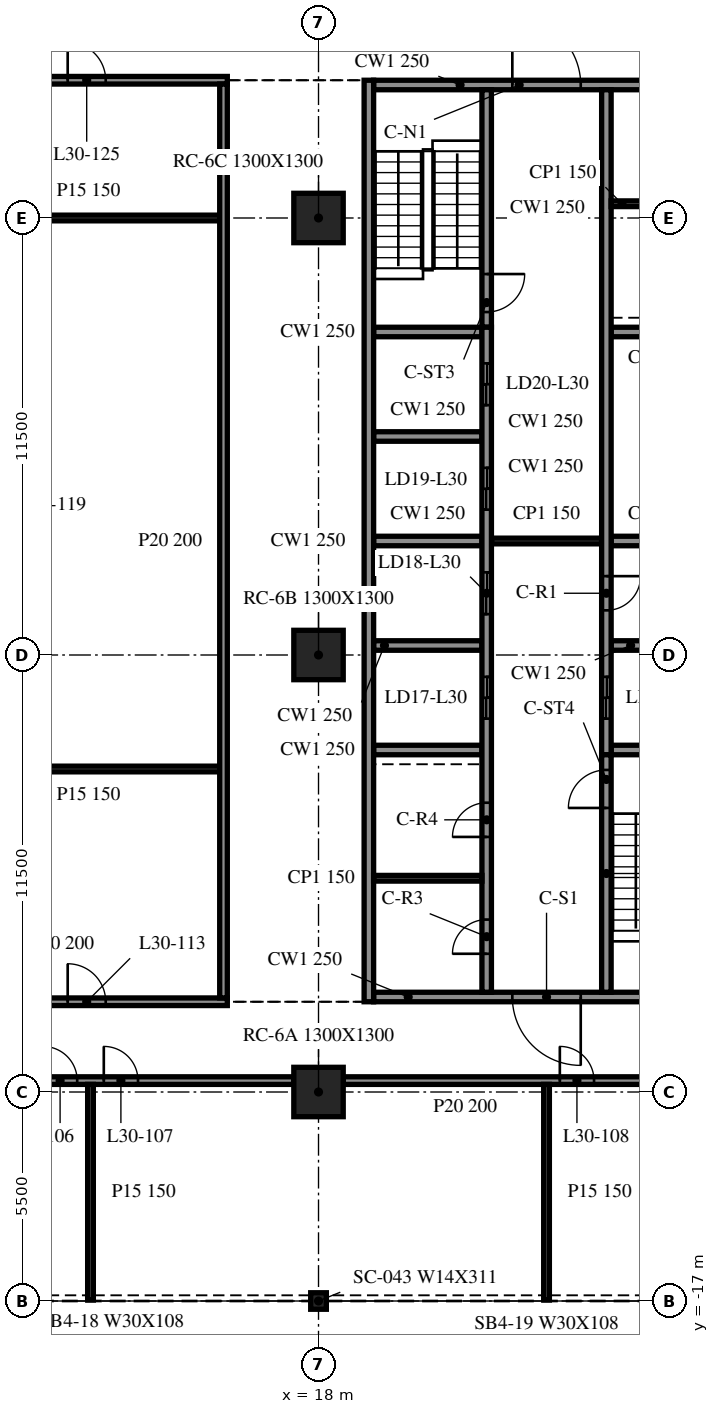
"""IFC4 building model, lengths in metres.
Left out: names, types, materials, properties, quantities, classifications, styles, units other than length and angle.
Written with IfcOpenShell. Run it as: python <this file> out.ifc"""

import sys

from ifc_helpers import new_model, si_unit, direction, frame, frame_2d, origin, origin_2d, place, context, subcontext, project, spatial, rectangle, i_section, extrude, element, fill, save


model = new_model("IFC4")
c1 = context("Model", 3, precision=1e-05, world=origin(), true_north=direction((0.0, 1.0)))
c2 = subcontext(c1, "Body", "Model", "MODEL_VIEW")
j1 = project(units=[si_unit("LENGTHUNIT", "METRE"), si_unit("PLANEANGLEUNIT", "RADIAN")], contexts=[c1])
p1 = place(None, origin())
s1 = spatial("IfcSite", under=j1, at=p1, CompositionType="ELEMENT")
p2 = place(p1, origin())
s2 = spatial("IfcBuilding", under=s1, at=p2, CompositionType="ELEMENT")
p3 = place(p2, frame((0.0, 0.0, 130.2)))
s3 = spatial("IfcBuildingStorey", under=s2, at=p3, CompositionType="ELEMENT", Elevation=130.2)
for number, where, z_axis, x_axis in (
    (1, (18.0, -11.5, -0.34), (0.0, 0.0, 1.0), (1.0, 0.0, 0.0)),
    (2, (18.0, 0.0, -0.34), (0.0, 0.0, 1.0), (1.0, 0.0, 0.0)),
    (3, (18.0, 11.5, -0.34), (0.0, 0.0, 1.0), (1.0, 0.0, 0.0)),
):
    element("IfcColumn", number, at=place(p3, frame(where, z_axis=z_axis, x_axis=x_axis)), inside=s3, PredefinedType="COLUMN", context=c2, shape_type="SweptSolid", body=[
        extrude(rectangle(XDim=1.3, YDim=1.3, at=origin_2d()), origin(), (0.0, 0.0, 1.0), 4.1),
    ])
p4 = place(p3, frame((18.0, -17.0, -0.34), z_axis=(0.0, 0.0, 1.0), x_axis=(1.0, 0.0, 0.0)))
e4 = element("IfcColumn", 4, at=p4, inside=s3, PredefinedType="COLUMN", context=c2, shape_type="SweptSolid", body=[
    extrude(i_section(OverallWidth=0.412, OverallDepth=0.434, WebThickness=0.036, FlangeThickness=0.057, at=origin_2d()), origin(), (0.0, 0.0, 1.0), 4.1),
])
p5 = place(p3, frame((19.325, 15.125, 0.0), z_axis=(0.0, 0.0, 1.0), x_axis=(0.0, -1.0, 0.0)))
e5 = element("IfcWall", 5, at=p5, inside=s3, PredefinedType="SOLIDWALL", context=c2, shape_type="SweptSolid", body=[
    extrude(rectangle(XDim=24.25, YDim=0.25, at=frame_2d((12.125, 0.0))), origin(), (0.0, 0.0, 1.0), 3.76),
])
p6 = place(p3, frame((28.55, -9.0, 0.0), z_axis=(0.0, 0.0, 1.0), x_axis=(-1.0, 0.0, 0.0)))
e6 = element("IfcWall", 6, at=p6, inside=s3, PredefinedType="SOLIDWALL", context=c2, shape_type="SweptSolid", body=[
    extrude(rectangle(XDim=9.1, YDim=0.25, at=frame_2d((4.55, 0.0))), origin(), (0.0, 0.0, 1.0), 3.76),
])
p7 = place(p6, frame((3.65, 0.0, 0.0)))
e7 = element("IfcOpeningElement", 7, at=p7, cuts=e6, PredefinedType="OPENING", context=c2, shape_type="SweptSolid", body=[
    extrude(rectangle(XDim=1.8, YDim=2.1, at=frame_2d((0.9, 1.05))), frame((0.0, 0.135, 0.0), z_axis=(0.0, -1.0, 0.0), x_axis=(1.0, 0.0, 0.0)), (0.0, 0.0, 1.0), 0.27),
])
p8 = place(p3, frame((19.45, 15.0, 0.0), z_axis=(0.0, 0.0, 1.0), x_axis=(1.0, 0.0, 0.0)))
e8 = element("IfcWall", 8, at=p8, inside=s3, PredefinedType="SOLIDWALL", context=c2, shape_type="SweptSolid", body=[
    extrude(rectangle(XDim=9.1, YDim=0.25, at=frame_2d((4.55, 0.0))), origin(), (0.0, 0.0, 1.0), 3.76),
])
p9 = place(p8, frame((3.65, 0.0, 0.0)))
e9 = element("IfcOpeningElement", 9, at=p9, cuts=e8, PredefinedType="OPENING", context=c2, shape_type="SweptSolid", body=[
    extrude(rectangle(XDim=1.8, YDim=2.1, at=frame_2d((0.9, 1.05))), frame((0.0, 0.135, 0.0), z_axis=(0.0, -1.0, 0.0), x_axis=(1.0, 0.0, 0.0)), (0.0, 0.0, 1.0), 0.27),
])
p10 = place(p3, frame((22.425, -8.875, 0.0), z_axis=(0.0, 0.0, 1.0), x_axis=(0.0, 1.0, 0.0)))
e10 = element("IfcWall", 10, at=p10, inside=s3, PredefinedType="SOLIDWALL", context=c2, shape_type="SweptSolid", body=[
    extrude(rectangle(XDim=17.5, YDim=0.25, at=frame_2d((8.75, 0.0))), origin(), (0.0, 0.0, 1.0), 3.76),
])
p11 = place(p10, frame((7.2, 0.0, 0.0)))
e11 = element("IfcOpeningElement", 11, at=p11, cuts=e10, PredefinedType="OPENING", context=c2, shape_type="SweptSolid", body=[
    extrude(rectangle(XDim=1.1, YDim=2.1, at=frame_2d((0.55, 1.05))), frame((0.0, 0.135, 0.0), z_axis=(0.0, -1.0, 0.0), x_axis=(1.0, 0.0, 0.0)), (0.0, 0.0, 1.0), 0.27),
])
p12 = place(p10, frame((9.95, 0.0, 0.0)))
e12 = element("IfcOpeningElement", 12, at=p12, cuts=e10, PredefinedType="OPENING", context=c2, shape_type="SweptSolid", body=[
    extrude(rectangle(XDim=1.1, YDim=2.1, at=frame_2d((0.55, 1.05))), frame((0.0, 0.135, 0.0), z_axis=(0.0, -1.0, 0.0), x_axis=(1.0, 0.0, 0.0)), (0.0, 0.0, 1.0), 0.27),
])
p13 = place(p10, frame((12.7, 0.0, 0.0)))
e13 = element("IfcOpeningElement", 13, at=p13, cuts=e10, PredefinedType="OPENING", context=c2, shape_type="SweptSolid", body=[
    extrude(rectangle(XDim=1.1, YDim=2.1, at=frame_2d((0.55, 1.05))), frame((0.0, 0.135, 0.0), z_axis=(0.0, -1.0, 0.0), x_axis=(1.0, 0.0, 0.0)), (0.0, 0.0, 1.0), 0.27),
])
p14 = place(p10, frame((15.45, 0.0, 0.0)))
e14 = element("IfcOpeningElement", 14, at=p14, cuts=e10, PredefinedType="OPENING", context=c2, shape_type="SweptSolid", body=[
    extrude(rectangle(XDim=1.1, YDim=2.1, at=frame_2d((0.55, 1.05))), frame((0.0, 0.135, 0.0), z_axis=(0.0, -1.0, 0.0), x_axis=(1.0, 0.0, 0.0)), (0.0, 0.0, 1.0), 0.27),
])
p15 = place(p10, frame((1.012, 0.0, 0.0)))
e15 = element("IfcOpeningElement", 15, at=p15, cuts=e10, PredefinedType="OPENING", context=c2, shape_type="SweptSolid", body=[
    extrude(rectangle(XDim=0.9, YDim=2.1, at=frame_2d((0.45, 1.05))), frame((0.0, 0.135, 0.0), z_axis=(0.0, -1.0, 0.0), x_axis=(1.0, 0.0, 0.0)), (0.0, 0.0, 1.0), 0.27),
])
p16 = place(p10, frame((4.087, 0.0, 0.0)))
e16 = element("IfcOpeningElement", 16, at=p16, cuts=e10, PredefinedType="OPENING", context=c2, shape_type="SweptSolid", body=[
    extrude(rectangle(XDim=0.9, YDim=2.1, at=frame_2d((0.45, 1.05))), frame((0.0, 0.135, 0.0), z_axis=(0.0, -1.0, 0.0), x_axis=(1.0, 0.0, 0.0)), (0.0, 0.0, 1.0), 0.27),
])
p17 = place(p3, frame((22.425, 14.875, 0.0), z_axis=(0.0, 0.0, 1.0), x_axis=(0.0, -1.0, 0.0)))
e17 = element("IfcWall", 17, at=p17, inside=s3, PredefinedType="SOLIDWALL", context=c2, shape_type="SweptSolid", body=[
    extrude(rectangle(XDim=6.25, YDim=0.25, at=frame_2d((3.125, 0.0))), origin(), (0.0, 0.0, 1.0), 3.76),
])
p18 = place(p17, frame((4.85, 0.0, 0.0)))
e18 = element("IfcOpeningElement", 18, at=p18, cuts=e17, PredefinedType="OPENING", context=c2, shape_type="SweptSolid", body=[
    extrude(rectangle(XDim=1.0, YDim=2.1, at=frame_2d((0.5, 1.05))), frame((0.0, 0.135, 0.0), z_axis=(0.0, -1.0, 0.0), x_axis=(1.0, 0.0, 0.0)), (0.0, 0.0, 1.0), 0.27),
])
p19 = place(p3, frame((25.575, -8.875, 0.0), z_axis=(0.0, 0.0, 1.0), x_axis=(0.0, 1.0, 0.0)))
e19 = element("IfcWall", 19, at=p19, inside=s3, PredefinedType="SOLIDWALL", context=c2, shape_type="SweptSolid", body=[
    extrude(rectangle(XDim=6.25, YDim=0.25, at=frame_2d((3.125, 0.0))), origin(), (0.0, 0.0, 1.0), 3.76),
])
p20 = place(p19, frame((4.85, 0.0, 0.0)))
e20 = element("IfcOpeningElement", 20, at=p20, cuts=e19, PredefinedType="OPENING", context=c2, shape_type="SweptSolid", body=[
    extrude(rectangle(XDim=1.0, YDim=2.1, at=frame_2d((0.5, 1.05))), frame((0.0, 0.135, 0.0), z_axis=(0.0, -1.0, 0.0), x_axis=(1.0, 0.0, 0.0)), (0.0, 0.0, 1.0), 0.27),
])
p21 = place(p3, frame((25.575, 14.875, 0.0), z_axis=(0.0, 0.0, 1.0), x_axis=(0.0, -1.0, 0.0)))
e21 = element("IfcWall", 21, at=p21, inside=s3, PredefinedType="SOLIDWALL", context=c2, shape_type="SweptSolid", body=[
    extrude(rectangle(XDim=17.5, YDim=0.25, at=frame_2d((8.75, 0.0))), origin(), (0.0, 0.0, 1.0), 3.76),
])
p22 = place(p21, frame((15.45, 0.0, 0.0)))
e22 = element("IfcOpeningElement", 22, at=p22, cuts=e21, PredefinedType="OPENING", context=c2, shape_type="SweptSolid", body=[
    extrude(rectangle(XDim=1.1, YDim=2.1, at=frame_2d((0.55, 1.05))), frame((0.0, 0.135, 0.0), z_axis=(0.0, -1.0, 0.0), x_axis=(1.0, 0.0, 0.0)), (0.0, 0.0, 1.0), 0.27),
])
p23 = place(p21, frame((12.8, 0.0, 0.0)))
e23 = element("IfcOpeningElement", 23, at=p23, cuts=e21, PredefinedType="OPENING", context=c2, shape_type="SweptSolid", body=[
    extrude(rectangle(XDim=0.9, YDim=2.1, at=frame_2d((0.45, 1.05))), frame((0.0, 0.135, 0.0), z_axis=(0.0, -1.0, 0.0), x_axis=(1.0, 0.0, 0.0)), (0.0, 0.0, 1.0), 0.27),
])
for number, where, z_axis, x_axis in (
    (24, (19.45, -2.5, 0.0), (0.0, 0.0, 1.0), (1.0, 0.0, 0.0)),
    (25, (19.45, 0.25, 0.0), (0.0, 0.0, 1.0), (1.0, 0.0, 0.0)),
    (26, (19.45, 3.0, 0.0), (0.0, 0.0, 1.0), (1.0, 0.0, 0.0)),
    (27, (19.45, 5.75, 0.0), (0.0, 0.0, 1.0), (1.0, 0.0, 0.0)),
    (28, (19.45, 8.5, 0.0), (0.0, 0.0, 1.0), (1.0, 0.0, 0.0)),
    (29, (25.7, -2.5, 0.0), (0.0, 0.0, 1.0), (1.0, 0.0, 0.0)),
    (30, (25.7, 0.25, 0.0), (0.0, 0.0, 1.0), (1.0, 0.0, 0.0)),
    (31, (25.7, 3.0, 0.0), (0.0, 0.0, 1.0), (1.0, 0.0, 0.0)),
    (32, (25.7, 8.5, 0.0), (0.0, 0.0, 1.0), (1.0, 0.0, 0.0)),
):
    element("IfcWall", number, at=place(p3, frame(where, z_axis=z_axis, x_axis=x_axis)), inside=s3, PredefinedType="SOLIDWALL", context=c2, shape_type="SweptSolid", body=[
        extrude(rectangle(XDim=2.85, YDim=0.25, at=frame_2d((1.425, 0.0))), origin(), (0.0, 0.0, 1.0), 3.76),
    ])
p24 = place(p3, frame((22.55, 3.0, 0.0), z_axis=(0.0, 0.0, 1.0), x_axis=(1.0, 0.0, 0.0)))
e33 = element("IfcWall", 33, at=p24, inside=s3, PredefinedType="PARTITIONING", context=c2, shape_type="SweptSolid", body=[
    extrude(rectangle(XDim=2.9, YDim=0.15, at=frame_2d((1.45, 0.0))), origin(), (0.0, 0.0, 1.0), 3.76),
])
for number, where, z_axis, x_axis in (
    (34, (19.45, -5.875, 0.0), (0.0, 0.0, 1.0), (1.0, 0.0, 0.0)),
    (35, (25.7, 11.875, 0.0), (0.0, 0.0, 1.0), (1.0, 0.0, 0.0)),
):
    element("IfcWall", number, at=place(p3, frame(where, z_axis=z_axis, x_axis=x_axis)), inside=s3, PredefinedType="PARTITIONING", context=c2, shape_type="SweptSolid", body=[
        extrude(rectangle(XDim=2.85, YDim=0.15, at=frame_2d((1.425, 0.0))), origin(), (0.0, 0.0, 1.0), 3.76),
    ])
p25 = place(p3, frame((6.65, -11.2, 0.0), z_axis=(0.0, 0.0, 1.0), x_axis=(1.0, 0.0, 0.0)))
e36 = element("IfcWall", 36, at=p25, inside=s3, PredefinedType="PARTITIONING", context=c2, shape_type="SweptSolid", body=[
    extrude(rectangle(XDim=10.7, YDim=0.2, at=frame_2d((5.35, 0.0))), origin(), (0.0, 0.0, 1.0), 3.76),
])
p26 = place(p25, frame((4.1, 0.0, 0.0)))
e37 = element("IfcOpeningElement", 37, at=p26, cuts=e36, PredefinedType="OPENING", context=c2, shape_type="SweptSolid", body=[
    extrude(rectangle(XDim=0.9, YDim=2.1, at=frame_2d((0.45, 1.05))), frame((0.0, 0.11, 0.0), z_axis=(0.0, -1.0, 0.0), x_axis=(1.0, 0.0, 0.0)), (0.0, 0.0, 1.0), 0.22),
])
p27 = place(p25, frame((5.7, 0.0, 0.0)))
e38 = element("IfcOpeningElement", 38, at=p27, cuts=e36, PredefinedType="OPENING", context=c2, shape_type="SweptSolid", body=[
    extrude(rectangle(XDim=0.9, YDim=2.1, at=frame_2d((0.45, 1.05))), frame((0.0, 0.11, 0.0), z_axis=(0.0, -1.0, 0.0), x_axis=(1.0, 0.0, 0.0)), (0.0, 0.0, 1.0), 0.22),
])
p28 = place(p3, frame((18.65, -11.2, 0.0), z_axis=(0.0, 0.0, 1.0), x_axis=(1.0, 0.0, 0.0)))
e39 = element("IfcWall", 39, at=p28, inside=s3, PredefinedType="PARTITIONING", context=c2, shape_type="SweptSolid", body=[
    extrude(rectangle(XDim=10.7, YDim=0.2, at=frame_2d((5.35, 0.0))), origin(), (0.0, 0.0, 1.0), 3.76),
])
p29 = place(p28, frame((5.7, 0.0, 0.0)))
e40 = element("IfcOpeningElement", 40, at=p29, cuts=e39, PredefinedType="OPENING", context=c2, shape_type="SweptSolid", body=[
    extrude(rectangle(XDim=0.9, YDim=2.1, at=frame_2d((0.45, 1.05))), frame((0.0, 0.11, 0.0), z_axis=(0.0, -1.0, 0.0), x_axis=(1.0, 0.0, 0.0)), (0.0, 0.0, 1.0), 0.22),
])
p30 = place(p3, frame((8.3, -9.125, 0.0), z_axis=(0.0, 0.0, 1.0), x_axis=(1.0, 0.0, 0.0)))
e41 = element("IfcWall", 41, at=p30, inside=s3, PredefinedType="PARTITIONING", context=c2, shape_type="SweptSolid", body=[
    extrude(rectangle(XDim=7.3, YDim=0.2, at=frame_2d((3.65, 0.0))), origin(), (0.0, 0.0, 1.0), 3.76),
])
p31 = place(p30, frame((3.1, 0.0, 0.0)))
e42 = element("IfcOpeningElement", 42, at=p31, cuts=e41, PredefinedType="OPENING", context=c2, shape_type="SweptSolid", body=[
    extrude(rectangle(XDim=1.0, YDim=2.1, at=frame_2d((0.5, 1.05))), frame((0.0, 0.11, 0.0), z_axis=(0.0, -1.0, 0.0), x_axis=(1.0, 0.0, 0.0)), (0.0, 0.0, 1.0), 0.22),
])
for number, where, z_axis, x_axis in (
    (43, (8.5, -3.0, 0.0), (0.0, 0.0, 1.0), (1.0, 0.0, 0.0)),
    (44, (8.5, 11.5, 0.0), (0.0, 0.0, 1.0), (1.0, 0.0, 0.0)),
):
    element("IfcWall", number, at=place(p3, frame(where, z_axis=z_axis, x_axis=x_axis)), inside=s3, PredefinedType="PARTITIONING", context=c2, shape_type="SweptSolid", body=[
        extrude(rectangle(XDim=6.9, YDim=0.15, at=frame_2d((3.45, 0.0))), origin(), (0.0, 0.0, 1.0), 3.76),
    ])
p32 = place(p3, frame((8.3, 15.125, 0.0), z_axis=(0.0, 0.0, 1.0), x_axis=(1.0, 0.0, 0.0)))
e45 = element("IfcWall", 45, at=p32, inside=s3, PredefinedType="PARTITIONING", context=c2, shape_type="SweptSolid", body=[
    extrude(rectangle(XDim=7.3, YDim=0.2, at=frame_2d((3.65, 0.0))), origin(), (0.0, 0.0, 1.0), 3.76),
])
p33 = place(p32, frame((3.1, 0.0, 0.0)))
e46 = element("IfcOpeningElement", 46, at=p33, cuts=e45, PredefinedType="OPENING", context=c2, shape_type="SweptSolid", body=[
    extrude(rectangle(XDim=1.0, YDim=2.1, at=frame_2d((0.5, 1.05))), frame((0.0, 0.11, 0.0), z_axis=(0.0, -1.0, 0.0), x_axis=(1.0, 0.0, 0.0)), (0.0, 0.0, 1.0), 0.22),
])
p34 = place(p3, frame((12.0, -16.975, 0.0), z_axis=(0.0, 0.0, 1.0), x_axis=(0.0, 1.0, 0.0)))
e47 = element("IfcWall", 47, at=p34, inside=s3, PredefinedType="PARTITIONING", context=c2, shape_type="SweptSolid", body=[
    extrude(rectangle(XDim=5.675, YDim=0.15, at=frame_2d((2.837, 0.0))), origin(), (0.0, 0.0, 1.0), 3.76),
])
p35 = place(p3, frame((15.5, -9.025, 0.0), z_axis=(0.0, 0.0, 1.0), x_axis=(0.0, 1.0, 0.0)))
e48 = element("IfcWall", 48, at=p35, inside=s3, PredefinedType="PARTITIONING", context=c2, shape_type="SweptSolid", body=[
    extrude(rectangle(XDim=24.05, YDim=0.2, at=frame_2d((12.025, 0.0))), origin(), (0.0, 0.0, 1.0), 3.76),
])
p36 = place(p3, frame((24.0, -16.975, 0.0), z_axis=(0.0, 0.0, 1.0), x_axis=(0.0, 1.0, 0.0)))
e49 = element("IfcWall", 49, at=p36, inside=s3, PredefinedType="PARTITIONING", context=c2, shape_type="SweptSolid", body=[
    extrude(rectangle(XDim=5.675, YDim=0.15, at=frame_2d((2.837, 0.0))), origin(), (0.0, 0.0, 1.0), 3.76),
])
p37 = place(p7, origin())
e50 = element("IfcDoor", 50, at=p37, inside=s3, OperationType="DOUBLE_DOOR_SINGLE_SWING", PredefinedType="DOOR", context=c2, shape_type="SweptSolid", body=[
    extrude(rectangle(XDim=1.8, YDim=2.1, at=frame_2d((0.9, 1.05))), frame((0.0, 0.025, 0.0), z_axis=(0.0, -1.0, 0.0), x_axis=(1.0, 0.0, 0.0)), (0.0, 0.0, 1.0), 0.05),
])
fill(e7, e50)
p38 = place(p9, origin())
e51 = element("IfcDoor", 51, at=p38, inside=s3, OperationType="DOUBLE_DOOR_SINGLE_SWING", PredefinedType="DOOR", context=c2, shape_type="SweptSolid", body=[
    extrude(rectangle(XDim=1.8, YDim=2.1, at=frame_2d((0.9, 1.05))), frame((0.0, 0.025, 0.0), z_axis=(0.0, -1.0, 0.0), x_axis=(1.0, 0.0, 0.0)), (0.0, 0.0, 1.0), 0.05),
])
fill(e9, e51)
p39 = place(p22, origin())
e52 = element("IfcDoor", 52, at=p39, inside=s3, OperationType="DOUBLE_DOOR_SLIDING", PredefinedType="DOOR", context=c2, shape_type="SweptSolid", body=[
    extrude(rectangle(XDim=1.1, YDim=2.1, at=frame_2d((0.55, 1.05))), frame((0.0, 0.025, 0.0), z_axis=(0.0, -1.0, 0.0), x_axis=(1.0, 0.0, 0.0)), (0.0, 0.0, 1.0), 0.05),
])
fill(e22, e52)
p40 = place(p11, origin())
e53 = element("IfcDoor", 53, at=p40, inside=s3, OperationType="DOUBLE_DOOR_SLIDING", PredefinedType="DOOR", context=c2, shape_type="SweptSolid", body=[
    extrude(rectangle(XDim=1.1, YDim=2.1, at=frame_2d((0.55, 1.05))), frame((0.0, 0.025, 0.0), z_axis=(0.0, -1.0, 0.0), x_axis=(1.0, 0.0, 0.0)), (0.0, 0.0, 1.0), 0.05),
])
fill(e11, e53)
p41 = place(p12, origin())
e54 = element("IfcDoor", 54, at=p41, inside=s3, OperationType="DOUBLE_DOOR_SLIDING", PredefinedType="DOOR", context=c2, shape_type="SweptSolid", body=[
    extrude(rectangle(XDim=1.1, YDim=2.1, at=frame_2d((0.55, 1.05))), frame((0.0, 0.025, 0.0), z_axis=(0.0, -1.0, 0.0), x_axis=(1.0, 0.0, 0.0)), (0.0, 0.0, 1.0), 0.05),
])
fill(e12, e54)
p42 = place(p13, origin())
e55 = element("IfcDoor", 55, at=p42, inside=s3, OperationType="DOUBLE_DOOR_SLIDING", PredefinedType="DOOR", context=c2, shape_type="SweptSolid", body=[
    extrude(rectangle(XDim=1.1, YDim=2.1, at=frame_2d((0.55, 1.05))), frame((0.0, 0.025, 0.0), z_axis=(0.0, -1.0, 0.0), x_axis=(1.0, 0.0, 0.0)), (0.0, 0.0, 1.0), 0.05),
])
fill(e13, e55)
p43 = place(p14, origin())
e56 = element("IfcDoor", 56, at=p43, inside=s3, OperationType="DOUBLE_DOOR_SLIDING", PredefinedType="DOOR", context=c2, shape_type="SweptSolid", body=[
    extrude(rectangle(XDim=1.1, YDim=2.1, at=frame_2d((0.55, 1.05))), frame((0.0, 0.025, 0.0), z_axis=(0.0, -1.0, 0.0), x_axis=(1.0, 0.0, 0.0)), (0.0, 0.0, 1.0), 0.05),
])
fill(e14, e56)
p44 = place(p23, origin())
e57 = element("IfcDoor", 57, at=p44, inside=s3, OperationType="SINGLE_SWING_LEFT", PredefinedType="DOOR", context=c2, shape_type="SweptSolid", body=[
    extrude(rectangle(XDim=0.9, YDim=2.1, at=frame_2d((0.45, 1.05))), frame((0.0, 0.025, 0.0), z_axis=(0.0, -1.0, 0.0), x_axis=(1.0, 0.0, 0.0)), (0.0, 0.0, 1.0), 0.05),
])
fill(e23, e57)
p45 = place(p15, origin())
e58 = element("IfcDoor", 58, at=p45, inside=s3, OperationType="SINGLE_SWING_LEFT", PredefinedType="DOOR", context=c2, shape_type="SweptSolid", body=[
    extrude(rectangle(XDim=0.9, YDim=2.1, at=frame_2d((0.45, 1.05))), frame((0.0, 0.025, 0.0), z_axis=(0.0, -1.0, 0.0), x_axis=(1.0, 0.0, 0.0)), (0.0, 0.0, 1.0), 0.05),
])
fill(e15, e58)
p46 = place(p16, origin())
e59 = element("IfcDoor", 59, at=p46, inside=s3, OperationType="SINGLE_SWING_RIGHT", PredefinedType="DOOR", context=c2, shape_type="SweptSolid", body=[
    extrude(rectangle(XDim=0.9, YDim=2.1, at=frame_2d((0.45, 1.05))), frame((0.0, 0.025, 0.0), z_axis=(0.0, -1.0, 0.0), x_axis=(1.0, 0.0, 0.0)), (0.0, 0.0, 1.0), 0.05),
])
fill(e16, e59)
p47 = place(p18, origin())
e60 = element("IfcDoor", 60, at=p47, inside=s3, OperationType="SINGLE_SWING_LEFT", PredefinedType="DOOR", context=c2, shape_type="SweptSolid", body=[
    extrude(rectangle(XDim=1.0, YDim=2.1, at=frame_2d((0.5, 1.05))), frame((0.0, 0.025, 0.0), z_axis=(0.0, -1.0, 0.0), x_axis=(1.0, 0.0, 0.0)), (0.0, 0.0, 1.0), 0.05),
])
fill(e18, e60)
p48 = place(p20, origin())
e61 = element("IfcDoor", 61, at=p48, inside=s3, OperationType="SINGLE_SWING_RIGHT", PredefinedType="DOOR", context=c2, shape_type="SweptSolid", body=[
    extrude(rectangle(XDim=1.0, YDim=2.1, at=frame_2d((0.5, 1.05))), frame((0.0, 0.025, 0.0), z_axis=(0.0, -1.0, 0.0), x_axis=(1.0, 0.0, 0.0)), (0.0, 0.0, 1.0), 0.05),
])
fill(e20, e61)
p49 = place(p26, origin())
e62 = element("IfcDoor", 62, at=p49, inside=s3, OperationType="SINGLE_SWING_RIGHT", PredefinedType="DOOR", context=c2, shape_type="SweptSolid", body=[
    extrude(rectangle(XDim=0.9, YDim=2.1, at=frame_2d((0.45, 1.05))), frame((0.0, 0.025, 0.0), z_axis=(0.0, -1.0, 0.0), x_axis=(1.0, 0.0, 0.0)), (0.0, 0.0, 1.0), 0.05),
])
fill(e37, e62)
p50 = place(p27, origin())
e63 = element("IfcDoor", 63, at=p50, inside=s3, OperationType="SINGLE_SWING_LEFT", PredefinedType="DOOR", context=c2, shape_type="SweptSolid", body=[
    extrude(rectangle(XDim=0.9, YDim=2.1, at=frame_2d((0.45, 1.05))), frame((0.0, 0.025, 0.0), z_axis=(0.0, -1.0, 0.0), x_axis=(1.0, 0.0, 0.0)), (0.0, 0.0, 1.0), 0.05),
])
fill(e38, e63)
p51 = place(p29, origin())
e64 = element("IfcDoor", 64, at=p51, inside=s3, OperationType="SINGLE_SWING_LEFT", PredefinedType="DOOR", context=c2, shape_type="SweptSolid", body=[
    extrude(rectangle(XDim=0.9, YDim=2.1, at=frame_2d((0.45, 1.05))), frame((0.0, 0.025, 0.0), z_axis=(0.0, -1.0, 0.0), x_axis=(1.0, 0.0, 0.0)), (0.0, 0.0, 1.0), 0.05),
])
fill(e40, e64)
p52 = place(p31, origin())
e65 = element("IfcDoor", 65, at=p52, inside=s3, OperationType="SINGLE_SWING_LEFT", PredefinedType="DOOR", context=c2, shape_type="SweptSolid", body=[
    extrude(rectangle(XDim=1.0, YDim=2.1, at=frame_2d((0.5, 1.05))), frame((0.0, 0.025, 0.0), z_axis=(0.0, -1.0, 0.0), x_axis=(1.0, 0.0, 0.0)), (0.0, 0.0, 1.0), 0.05),
])
fill(e42, e65)
p53 = place(p33, origin())
e66 = element("IfcDoor", 66, at=p53, inside=s3, OperationType="SINGLE_SWING_RIGHT", PredefinedType="DOOR", context=c2, shape_type="SweptSolid", body=[
    extrude(rectangle(XDim=1.0, YDim=2.1, at=frame_2d((0.5, 1.05))), frame((0.0, 0.025, 0.0), z_axis=(0.0, -1.0, 0.0), x_axis=(1.0, 0.0, 0.0)), (0.0, 0.0, 1.0), 0.05),
])
fill(e46, e66)
save(model, sys.argv[1])
